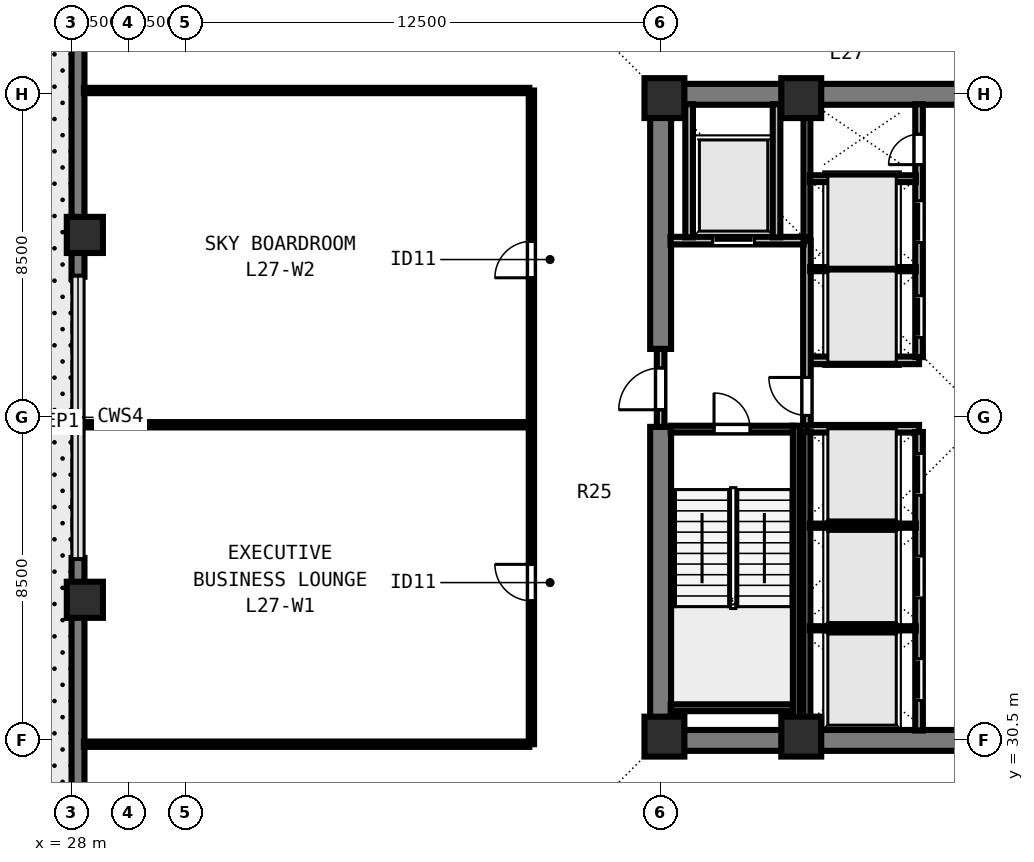
"""IFC4 building model, lengths in metres.
Left out: names, types, materials, properties, quantities, classifications, styles, units other than length and angle.
Written with IfcOpenShell. Run it as: python <this file> out.ifc"""

import sys

from ifc_helpers import new_model, si_unit, direction, frame, frame_2d, origin, origin_2d, place, context, subcontext, project, spatial, rectangle, extrude, element, fill, save


model = new_model("IFC4")
c1 = context("Model", 3, precision=1e-05, world=origin(), true_north=direction((0.0, 1.0)))
c2 = subcontext(c1, "Body", "Model", "MODEL_VIEW")
j1 = project(units=[si_unit("LENGTHUNIT", "METRE"), si_unit("PLANEANGLEUNIT", "RADIAN")], contexts=[c1])
p1 = place(None, origin())
s1 = spatial("IfcSite", under=j1, at=p1, CompositionType="ELEMENT")
p2 = place(p1, origin())
s2 = spatial("IfcBuilding", under=s1, at=p2, CompositionType="ELEMENT")
p3 = place(p2, frame((0.0, 0.0, 101.5)))
s3 = spatial("IfcBuildingStorey", under=s2, at=p3, CompositionType="ELEMENT", Elevation=101.5)
for number, where, z_axis, x_axis in (
    (1, (43.6, 30.6, 0.0), (0.0, 0.0, 1.0), (1.0, 0.0, 0.0)),
    (2, (47.2, 30.6, 0.0), (0.0, 0.0, 1.0), (1.0, 0.0, 0.0)),
    (3, (43.6, 47.4, 0.0), (0.0, 0.0, 1.0), (1.0, 0.0, 0.0)),
    (4, (47.2, 47.4, 0.0), (0.0, 0.0, 1.0), (1.0, 0.0, 0.0)),
):
    element("IfcColumn", number, at=place(p3, frame(where, z_axis=z_axis, x_axis=x_axis)), inside=s3, PredefinedType="COLUMN", context=c2, shape_type="SweptSolid", body=[
        extrude(rectangle(XDim=1.05, YDim=1.05, at=origin_2d()), origin(), (0.0, 0.0, 1.0), 4.5),
    ])
for number, where, z_axis, x_axis in (
    (5, (28.35, 43.8, 0.0), (0.0, 0.0, 1.0), (0.0, 1.0, 0.0)),
    (6, (28.35, 34.2, 0.0), (0.0, 0.0, 1.0), (0.0, 1.0, 0.0)),
):
    element("IfcColumn", number, at=place(p3, frame(where, z_axis=z_axis, x_axis=x_axis)), inside=s3, PredefinedType="COLUMN", context=c2, shape_type="SweptSolid", body=[
        extrude(rectangle(XDim=0.95, YDim=0.95, at=origin_2d()), origin(), (0.0, 0.0, 1.0), 4.5),
    ])
p4 = place(p3, frame((28.17, 19.0, 0.0), z_axis=(0.0, 0.0, 1.0), x_axis=(0.0, 1.0, 0.0)))
e7 = element("IfcWall", 7, at=p4, inside=s3, PredefinedType="SOLIDWALL", context=c2, shape_type="SweptSolid", body=[
    extrude(rectangle(XDim=16.3, YDim=0.34, at=frame_2d((8.15, 0.0))), origin(), (0.0, 0.0, 1.0), 4.28),
])
p5 = place(p3, frame((28.17, 42.7, 0.0), z_axis=(0.0, 0.0, 1.0), x_axis=(0.0, 1.0, 0.0)))
e8 = element("IfcWall", 8, at=p5, inside=s3, PredefinedType="SOLIDWALL", context=c2, shape_type="SweptSolid", body=[
    extrude(rectangle(XDim=15.982, YDim=0.34, at=frame_2d((7.991, 0.0))), origin(), (0.0, 0.0, 1.0), 4.28),
])
for number, where, z_axis, x_axis in (
    (9, (43.225, 30.5, 0.0), (0.0, 0.0, 1.0), (1.0, 0.0, 0.0)),
    (10, (43.225, 47.5, 0.0), (0.0, 0.0, 1.0), (1.0, 0.0, 0.0)),
):
    element("IfcWall", number, at=place(p3, frame(where, z_axis=z_axis, x_axis=x_axis)), inside=s3, PredefinedType="SHEAR", context=c2, shape_type="SweptSolid", body=[
        extrude(rectangle(XDim=17.55, YDim=0.55, at=frame_2d((8.775, 0.0))), origin(), (0.0, 0.0, 1.0), 4.28),
    ])
p6 = place(p3, frame((43.5, 30.765, 0.0), z_axis=(0.0, 0.0, 1.0), x_axis=(0.0, 1.0, 0.0)))
e11 = element("IfcWall", 11, at=p6, inside=s3, PredefinedType="SHEAR", context=c2, shape_type="SweptSolid", body=[
    extrude(rectangle(XDim=7.985, YDim=0.55, at=frame_2d((3.993, 0.0))), origin(), (0.0, 0.0, 1.0), 4.28),
])
p7 = place(p3, frame((43.5, 40.8, 0.0), z_axis=(0.0, 0.0, 1.0), x_axis=(0.0, 1.0, 0.0)))
e12 = element("IfcWall", 12, at=p7, inside=s3, PredefinedType="SHEAR", context=c2, shape_type="SweptSolid", body=[
    extrude(rectangle(XDim=6.435, YDim=0.55, at=frame_2d((3.218, 0.0))), origin(), (0.0, 0.0, 1.0), 4.28),
])
for number, where, z_axis, x_axis in (
    (13, (47.35, 38.7, 0.0), (0.0, 0.0, 1.0), (1.0, 0.0, 0.0)),
    (14, (47.35, 40.5, 0.0), (0.0, 0.0, 1.0), (1.0, 0.0, 0.0)),
):
    element("IfcWall", number, at=place(p3, frame(where, z_axis=z_axis, x_axis=x_axis)), inside=s3, PredefinedType="SOLIDWALL", context=c2, shape_type="SweptSolid", body=[
        extrude(rectangle(XDim=2.95, YDim=0.2, at=frame_2d((1.475, 0.0))), origin(), (0.0, 0.0, 1.0), 4.28),
    ])
p8 = place(p3, frame((50.3, 30.76, 0.0), z_axis=(0.0, 0.0, 1.0), x_axis=(0.0, 1.0, 0.0)))
e15 = element("IfcWall", 15, at=p8, inside=s3, PredefinedType="SOLIDWALL", context=c2, shape_type="SweptSolid", body=[
    extrude(rectangle(XDim=7.855, YDim=0.2, at=frame_2d((3.927, 0.0))), origin(), (0.0, 0.0, 1.0), 4.28),
])
p9 = place(p8, frame((0.79, 0.0, 0.0)))
e16 = element("IfcOpeningElement", 16, at=p9, cuts=e15, PredefinedType="OPENING", context=c2, shape_type="SweptSolid", body=[
    extrude(rectangle(XDim=1.1, YDim=2.2, at=frame_2d((0.55, 1.1))), frame((0.0, 0.11, 0.0), z_axis=(0.0, -1.0, 0.0), x_axis=(1.0, 0.0, 0.0)), (0.0, 0.0, 1.0), 0.22),
])
p10 = place(p8, frame((3.49, 0.0, 0.0)))
e17 = element("IfcOpeningElement", 17, at=p10, cuts=e15, PredefinedType="OPENING", context=c2, shape_type="SweptSolid", body=[
    extrude(rectangle(XDim=1.1, YDim=2.2, at=frame_2d((0.55, 1.1))), frame((0.0, 0.11, 0.0), z_axis=(0.0, -1.0, 0.0), x_axis=(1.0, 0.0, 0.0)), (0.0, 0.0, 1.0), 0.22),
])
p11 = place(p8, frame((6.19, 0.0, 0.0)))
e18 = element("IfcOpeningElement", 18, at=p11, cuts=e15, PredefinedType="OPENING", context=c2, shape_type="SweptSolid", body=[
    extrude(rectangle(XDim=1.1, YDim=2.2, at=frame_2d((0.55, 1.1))), frame((0.0, 0.11, 0.0), z_axis=(0.0, -1.0, 0.0), x_axis=(1.0, 0.0, 0.0)), (0.0, 0.0, 1.0), 0.22),
])
p12 = place(p3, frame((50.3, 40.585, 0.0), z_axis=(0.0, 0.0, 1.0), x_axis=(0.0, 1.0, 0.0)))
e19 = element("IfcWall", 19, at=p12, inside=s3, PredefinedType="SOLIDWALL", context=c2, shape_type="SweptSolid", body=[
    extrude(rectangle(XDim=6.655, YDim=0.2, at=frame_2d((3.328, 0.0))), origin(), (0.0, 0.0, 1.0), 4.28),
])
p13 = place(p12, frame((0.515, 0.0, 0.0)))
e20 = element("IfcOpeningElement", 20, at=p13, cuts=e19, PredefinedType="OPENING", context=c2, shape_type="SweptSolid", body=[
    extrude(rectangle(XDim=1.1, YDim=2.2, at=frame_2d((0.55, 1.1))), frame((0.0, 0.11, 0.0), z_axis=(0.0, -1.0, 0.0), x_axis=(1.0, 0.0, 0.0)), (0.0, 0.0, 1.0), 0.22),
])
p14 = place(p12, frame((3.015, 0.0, 0.0)))
e21 = element("IfcOpeningElement", 21, at=p14, cuts=e19, PredefinedType="OPENING", context=c2, shape_type="SweptSolid", body=[
    extrude(rectangle(XDim=1.1, YDim=2.2, at=frame_2d((0.55, 1.1))), frame((0.0, 0.11, 0.0), z_axis=(0.0, -1.0, 0.0), x_axis=(1.0, 0.0, 0.0)), (0.0, 0.0, 1.0), 0.22),
])
p15 = place(p12, frame((5.065, 0.0, 0.0)))
e22 = element("IfcOpeningElement", 22, at=p15, cuts=e19, PredefinedType="OPENING", context=c2, shape_type="SweptSolid", body=[
    extrude(rectangle(XDim=0.8, YDim=2.08, at=frame_2d((0.4, 1.04))), frame((0.0, 0.11, 0.0), z_axis=(0.0, -1.0, 0.0), x_axis=(1.0, 0.0, 0.0)), (0.0, 0.0, 1.0), 0.22),
])
p16 = place(p3, frame((43.5, 38.75, 0.0), z_axis=(0.0, 0.0, 1.0), x_axis=(0.0, 1.0, 0.0)))
e23 = element("IfcWall", 23, at=p16, inside=s3, PredefinedType="SOLIDWALL", context=c2, shape_type="SweptSolid", body=[
    extrude(rectangle(XDim=2.05, YDim=0.2, at=frame_2d((1.025, 0.0))), origin(), (0.0, 0.0, 1.0), 4.28),
])
p17 = place(p16, frame((0.45, 0.0, 0.0)))
e24 = element("IfcOpeningElement", 24, at=p17, cuts=e23, PredefinedType="OPENING", context=c2, shape_type="SweptSolid", body=[
    extrude(rectangle(XDim=1.1, YDim=2.15, at=frame_2d((0.55, 1.075))), frame((0.0, 0.11, 0.0), z_axis=(0.0, -1.0, 0.0), x_axis=(1.0, 0.0, 0.0)), (0.0, 0.0, 1.0), 0.22),
])
p18 = place(p3, frame((47.35, 38.785, 0.0), z_axis=(0.0, 0.0, 1.0), x_axis=(0.0, 1.0, 0.0)))
e25 = element("IfcWall", 25, at=p18, inside=s3, PredefinedType="SOLIDWALL", context=c2, shape_type="SweptSolid", body=[
    extrude(rectangle(XDim=4.865, YDim=0.2, at=frame_2d((2.433, 0.0))), origin(), (0.0, 0.0, 1.0), 4.28),
])
p19 = place(p18, frame((0.265, 0.0, 0.0)))
e26 = element("IfcOpeningElement", 26, at=p19, cuts=e25, PredefinedType="OPENING", context=c2, shape_type="SweptSolid", body=[
    extrude(rectangle(XDim=1.0, YDim=2.15, at=frame_2d((0.5, 1.075))), frame((0.0, 0.11, 0.0), z_axis=(0.0, -1.0, 0.0), x_axis=(1.0, 0.0, 0.0)), (0.0, 0.0, 1.0), 0.22),
])
p20 = place(p3, frame((43.76, 43.65, 0.0), z_axis=(0.0, 0.0, 1.0), x_axis=(1.0, 0.0, 0.0)))
e27 = element("IfcWall", 27, at=p20, inside=s3, PredefinedType="SOLIDWALL", context=c2, shape_type="SweptSolid", body=[
    extrude(rectangle(XDim=3.505, YDim=0.2, at=frame_2d((1.752, 0.0))), origin(), (0.0, 0.0, 1.0), 4.28),
])
p21 = place(p20, frame((1.11, 0.0, 0.0)))
e28 = element("IfcOpeningElement", 28, at=p21, cuts=e27, PredefinedType="OPENING", context=c2, shape_type="SweptSolid", body=[
    extrude(rectangle(XDim=1.1, YDim=2.2, at=frame_2d((0.55, 1.1))), frame((0.0, 0.11, 0.0), z_axis=(0.0, -1.0, 0.0), x_axis=(1.0, 0.0, 0.0)), (0.0, 0.0, 1.0), 0.22),
])
for number, where, z_axis, x_axis in (
    (29, (46.55, 43.735, 0.0), (0.0, 0.0, 1.0), (0.0, 1.0, 0.0)),
    (30, (44.25, 43.735, 0.0), (0.0, 0.0, 1.0), (0.0, 1.0, 0.0)),
):
    element("IfcWall", number, at=place(p3, frame(where, z_axis=z_axis, x_axis=x_axis)), inside=s3, PredefinedType="SOLIDWALL", context=c2, shape_type="SweptSolid", body=[
        extrude(rectangle(XDim=3.505, YDim=0.2, at=frame_2d((1.752, 0.0))), origin(), (0.0, 0.0, 1.0), 4.28),
    ])
p22 = place(p3, frame((47.35, 30.76, 0.0), z_axis=(0.0, 0.0, 1.0), x_axis=(0.0, 1.0, 0.0)))
e31 = element("IfcWall", 31, at=p22, inside=s3, PredefinedType="SOLIDWALL", context=c2, shape_type="SweptSolid", body=[
    extrude(rectangle(XDim=7.855, YDim=0.18, at=frame_2d((3.927, 0.0))), origin(), (0.0, 0.0, 1.0), 4.28),
])
for number, where, z_axis, x_axis in (
    (32, (47.425, 33.45, 0.0), (0.0, 0.0, 1.0), (1.0, 0.0, 0.0)),
    (33, (47.425, 36.15, 0.0), (0.0, 0.0, 1.0), (1.0, 0.0, 0.0)),
):
    element("IfcWall", number, at=place(p3, frame(where, z_axis=z_axis, x_axis=x_axis)), inside=s3, PredefinedType="PARTITIONING", context=c2, shape_type="SweptSolid", body=[
        extrude(rectangle(XDim=2.79, YDim=0.11, at=frame_2d((1.395, 0.0))), origin(), (0.0, 0.0, 1.0), 4.28),
    ])
p23 = place(p3, frame((47.35, 43.735, 0.0), z_axis=(0.0, 0.0, 1.0), x_axis=(0.0, 1.0, 0.0)))
e34 = element("IfcWall", 34, at=p23, inside=s3, PredefinedType="SOLIDWALL", context=c2, shape_type="SweptSolid", body=[
    extrude(rectangle(XDim=3.505, YDim=0.18, at=frame_2d((1.752, 0.0))), origin(), (0.0, 0.0, 1.0), 4.28),
])
p24 = place(p3, frame((47.435, 42.9, 0.0), z_axis=(0.0, 0.0, 1.0), x_axis=(1.0, 0.0, 0.0)))
e35 = element("IfcWall", 35, at=p24, inside=s3, PredefinedType="PARTITIONING", context=c2, shape_type="SweptSolid", body=[
    extrude(rectangle(XDim=2.78, YDim=0.11, at=frame_2d((1.39, 0.0))), origin(), (0.0, 0.0, 1.0), 4.28),
])
p25 = place(p3, frame((47.425, 45.28, 0.0), z_axis=(0.0, 0.0, 1.0), x_axis=(1.0, 0.0, 0.0)))
e36 = element("IfcWall", 36, at=p25, inside=s3, PredefinedType="SOLIDWALL", context=c2, shape_type="SweptSolid", body=[
    extrude(rectangle(XDim=2.79, YDim=0.18, at=frame_2d((1.395, 0.0))), origin(), (0.0, 0.0, 1.0), 4.28),
])
p26 = place(p3, frame((40.1, 30.4, 0.0), z_axis=(0.0, 0.0, 1.0), x_axis=(0.0, 1.0, 0.0)))
e37 = element("IfcWall", 37, at=p26, inside=s3, PredefinedType="PARTITIONING", context=c2, shape_type="SweptSolid", body=[
    extrude(rectangle(XDim=17.2, YDim=0.14, at=frame_2d((8.6, 0.0))), origin(), (0.0, 0.0, 1.0), 4.28),
])
p27 = place(p26, frame((3.772, 0.0, 0.0)))
e38 = element("IfcOpeningElement", 38, at=p27, cuts=e37, PredefinedType="OPENING", context=c2, shape_type="SweptSolid", body=[
    extrude(rectangle(XDim=0.96, YDim=2.12, at=frame_2d((0.48, 1.06))), frame((0.0, 0.08, 0.0), z_axis=(0.0, -1.0, 0.0), x_axis=(1.0, 0.0, 0.0)), (0.0, 0.0, 1.0), 0.16),
])
p28 = place(p26, frame((12.272, 0.0, 0.0)))
e39 = element("IfcOpeningElement", 39, at=p28, cuts=e37, PredefinedType="OPENING", context=c2, shape_type="SweptSolid", body=[
    extrude(rectangle(XDim=0.96, YDim=2.12, at=frame_2d((0.48, 1.06))), frame((0.0, 0.08, 0.0), z_axis=(0.0, -1.0, 0.0), x_axis=(1.0, 0.0, 0.0)), (0.0, 0.0, 1.0), 0.16),
])
for number, where, z_axis, x_axis in (
    (40, (28.325, 30.4, 0.0), (0.0, 0.0, 1.0), (1.0, 0.0, 0.0)),
    (41, (28.325, 47.6, 0.0), (0.0, 0.0, 1.0), (1.0, 0.0, 0.0)),
):
    element("IfcWall", number, at=place(p3, frame(where, z_axis=z_axis, x_axis=x_axis)), inside=s3, PredefinedType="PARTITIONING", context=c2, shape_type="SweptSolid", body=[
        extrude(rectangle(XDim=11.72, YDim=0.14, at=frame_2d((5.86, 0.0))), origin(), (0.0, 0.0, 1.0), 4.28),
    ])
p29 = place(p3, frame((28.17, 38.805, 0.0), z_axis=(0.0, 0.0, 1.0), x_axis=(1.0, 0.0, 0.0)))
e42 = element("IfcWall", 42, at=p29, inside=s3, PredefinedType="PARTITIONING", context=c2, shape_type="SweptSolid", body=[
    extrude(rectangle(XDim=11.83, YDim=0.14, at=frame_2d((5.915, 0.0))), origin(), (0.0, 0.0, 1.0), 3.896),
])
p30 = place(p3, frame((43.765, 38.69, 0.0), z_axis=(0.0, 0.0, 1.0), x_axis=(1.0, 0.0, 0.0)))
e43 = element("IfcWall", 43, at=p30, inside=s3, PredefinedType="SOLIDWALL", context=c2, shape_type="SweptSolid", body=[
    extrude(rectangle(XDim=3.23, YDim=0.18, at=frame_2d((1.615, 0.0))), origin(), (0.0, 0.0, 1.0), 4.28),
])
p31 = place(p30, frame((1.14, 0.0, 0.0)))
e44 = element("IfcOpeningElement", 44, at=p31, cuts=e43, PredefinedType="OPENING", context=c2, shape_type="SweptSolid", body=[
    extrude(rectangle(XDim=0.95, YDim=2.15, at=frame_2d((0.475, 1.075))), frame((0.0, 0.1, 0.0), z_axis=(0.0, -1.0, 0.0), x_axis=(1.0, 0.0, 0.0)), (0.0, 0.0, 1.0), 0.2),
])
p32 = place(p3, frame((43.765, 31.36, 0.0), z_axis=(0.0, 0.0, 1.0), x_axis=(1.0, 0.0, 0.0)))
e45 = element("IfcWall", 45, at=p32, inside=s3, PredefinedType="SOLIDWALL", context=c2, shape_type="SweptSolid", body=[
    extrude(rectangle(XDim=3.23, YDim=0.18, at=frame_2d((1.615, 0.0))), origin(), (0.0, 0.0, 1.0), 4.28),
])
p33 = place(p3, frame((47.07, 38.78, 0.0), z_axis=(0.0, 0.0, 1.0), x_axis=(0.0, -1.0, 0.0)))
e46 = element("IfcWall", 46, at=p33, inside=s3, PredefinedType="SOLIDWALL", context=c2, shape_type="SweptSolid", body=[
    extrude(rectangle(XDim=8.017, YDim=0.18, at=frame_2d((4.009, 0.0))), origin(), (0.0, 0.0, 1.0), 4.28),
])
p34 = place(p17, origin())
e47 = element("IfcDoor", 47, at=p34, inside=s3, OperationType="SINGLE_SWING_LEFT", PredefinedType="DOOR", context=c2, shape_type="SweptSolid", body=[
    extrude(rectangle(XDim=1.1, YDim=2.15, at=frame_2d((0.55, 1.075))), frame((0.0, 0.025, 0.0), z_axis=(0.0, -1.0, 0.0), x_axis=(1.0, 0.0, 0.0)), (0.0, 0.0, 1.0), 0.05),
])
fill(e24, e47)
p35 = place(p19, origin())
e48 = element("IfcDoor", 48, at=p35, inside=s3, OperationType="SINGLE_SWING_RIGHT", PredefinedType="DOOR", context=c2, shape_type="SweptSolid", body=[
    extrude(rectangle(XDim=1.0, YDim=2.15, at=frame_2d((0.5, 1.075))), frame((0.0, 0.025, 0.0), z_axis=(0.0, -1.0, 0.0), x_axis=(1.0, 0.0, 0.0)), (0.0, 0.0, 1.0), 0.05),
])
fill(e26, e48)
p36 = place(p21, origin())
e49 = element("IfcDoor", 49, at=p36, inside=s3, OperationType="SLIDING_TO_LEFT", PredefinedType="DOOR", context=c2, shape_type="SweptSolid", body=[
    extrude(rectangle(XDim=1.1, YDim=2.2, at=frame_2d((0.55, 1.1))), frame((0.0, 0.025, 0.0), z_axis=(0.0, -1.0, 0.0), x_axis=(1.0, 0.0, 0.0)), (0.0, 0.0, 1.0), 0.05),
])
fill(e28, e49)
p37 = place(p9, origin())
e50 = element("IfcDoor", 50, at=p37, inside=s3, OperationType="SLIDING_TO_LEFT", PredefinedType="DOOR", context=c2, shape_type="SweptSolid", body=[
    extrude(rectangle(XDim=1.1, YDim=2.2, at=frame_2d((0.55, 1.1))), frame((0.0, 0.025, 0.0), z_axis=(0.0, -1.0, 0.0), x_axis=(1.0, 0.0, 0.0)), (0.0, 0.0, 1.0), 0.05),
])
fill(e16, e50)
p38 = place(p10, origin())
e51 = element("IfcDoor", 51, at=p38, inside=s3, OperationType="SLIDING_TO_LEFT", PredefinedType="DOOR", context=c2, shape_type="SweptSolid", body=[
    extrude(rectangle(XDim=1.1, YDim=2.2, at=frame_2d((0.55, 1.1))), frame((0.0, 0.025, 0.0), z_axis=(0.0, -1.0, 0.0), x_axis=(1.0, 0.0, 0.0)), (0.0, 0.0, 1.0), 0.05),
])
fill(e17, e51)
p39 = place(p11, origin())
e52 = element("IfcDoor", 52, at=p39, inside=s3, OperationType="SLIDING_TO_LEFT", PredefinedType="DOOR", context=c2, shape_type="SweptSolid", body=[
    extrude(rectangle(XDim=1.1, YDim=2.2, at=frame_2d((0.55, 1.1))), frame((0.0, 0.025, 0.0), z_axis=(0.0, -1.0, 0.0), x_axis=(1.0, 0.0, 0.0)), (0.0, 0.0, 1.0), 0.05),
])
fill(e18, e52)
p40 = place(p13, origin())
e53 = element("IfcDoor", 53, at=p40, inside=s3, OperationType="SLIDING_TO_LEFT", PredefinedType="DOOR", context=c2, shape_type="SweptSolid", body=[
    extrude(rectangle(XDim=1.1, YDim=2.2, at=frame_2d((0.55, 1.1))), frame((0.0, 0.025, 0.0), z_axis=(0.0, -1.0, 0.0), x_axis=(1.0, 0.0, 0.0)), (0.0, 0.0, 1.0), 0.05),
])
fill(e20, e53)
p41 = place(p14, origin())
e54 = element("IfcDoor", 54, at=p41, inside=s3, OperationType="SLIDING_TO_LEFT", PredefinedType="DOOR", context=c2, shape_type="SweptSolid", body=[
    extrude(rectangle(XDim=1.1, YDim=2.2, at=frame_2d((0.55, 1.1))), frame((0.0, 0.025, 0.0), z_axis=(0.0, -1.0, 0.0), x_axis=(1.0, 0.0, 0.0)), (0.0, 0.0, 1.0), 0.05),
])
fill(e21, e54)
p42 = place(p15, origin())
e55 = element("IfcDoor", 55, at=p42, inside=s3, OperationType="SINGLE_SWING_LEFT", PredefinedType="DOOR", context=c2, shape_type="SweptSolid", body=[
    extrude(rectangle(XDim=0.8, YDim=2.08, at=frame_2d((0.4, 1.04))), frame((0.0, 0.025, 0.0), z_axis=(0.0, -1.0, 0.0), x_axis=(1.0, 0.0, 0.0)), (0.0, 0.0, 1.0), 0.05),
])
fill(e22, e55)
p43 = place(p27, origin())
e56 = element("IfcDoor", 56, at=p43, inside=s3, OperationType="SINGLE_SWING_RIGHT", PredefinedType="DOOR", context=c2, shape_type="SweptSolid", body=[
    extrude(rectangle(XDim=0.96, YDim=2.12, at=frame_2d((0.48, 1.06))), frame((0.0, 0.025, 0.0), z_axis=(0.0, -1.0, 0.0), x_axis=(1.0, 0.0, 0.0)), (0.0, 0.0, 1.0), 0.05),
])
fill(e38, e56)
p44 = place(p28, origin())
e57 = element("IfcDoor", 57, at=p44, inside=s3, OperationType="SINGLE_SWING_LEFT", PredefinedType="DOOR", context=c2, shape_type="SweptSolid", body=[
    extrude(rectangle(XDim=0.96, YDim=2.12, at=frame_2d((0.48, 1.06))), frame((0.0, 0.025, 0.0), z_axis=(0.0, -1.0, 0.0), x_axis=(1.0, 0.0, 0.0)), (0.0, 0.0, 1.0), 0.05),
])
fill(e39, e57)
p45 = place(p31, origin())
e58 = element("IfcDoor", 58, at=p45, inside=s3, OperationType="SINGLE_SWING_LEFT", PredefinedType="DOOR", context=c2, shape_type="SweptSolid", body=[
    extrude(rectangle(XDim=0.95, YDim=2.15, at=frame_2d((0.475, 1.075))), frame((0.0, 0.025, 0.0), z_axis=(0.0, -1.0, 0.0), x_axis=(1.0, 0.0, 0.0)), (0.0, 0.0, 1.0), 0.05),
])
fill(e44, e58)
save(model, sys.argv[1])
